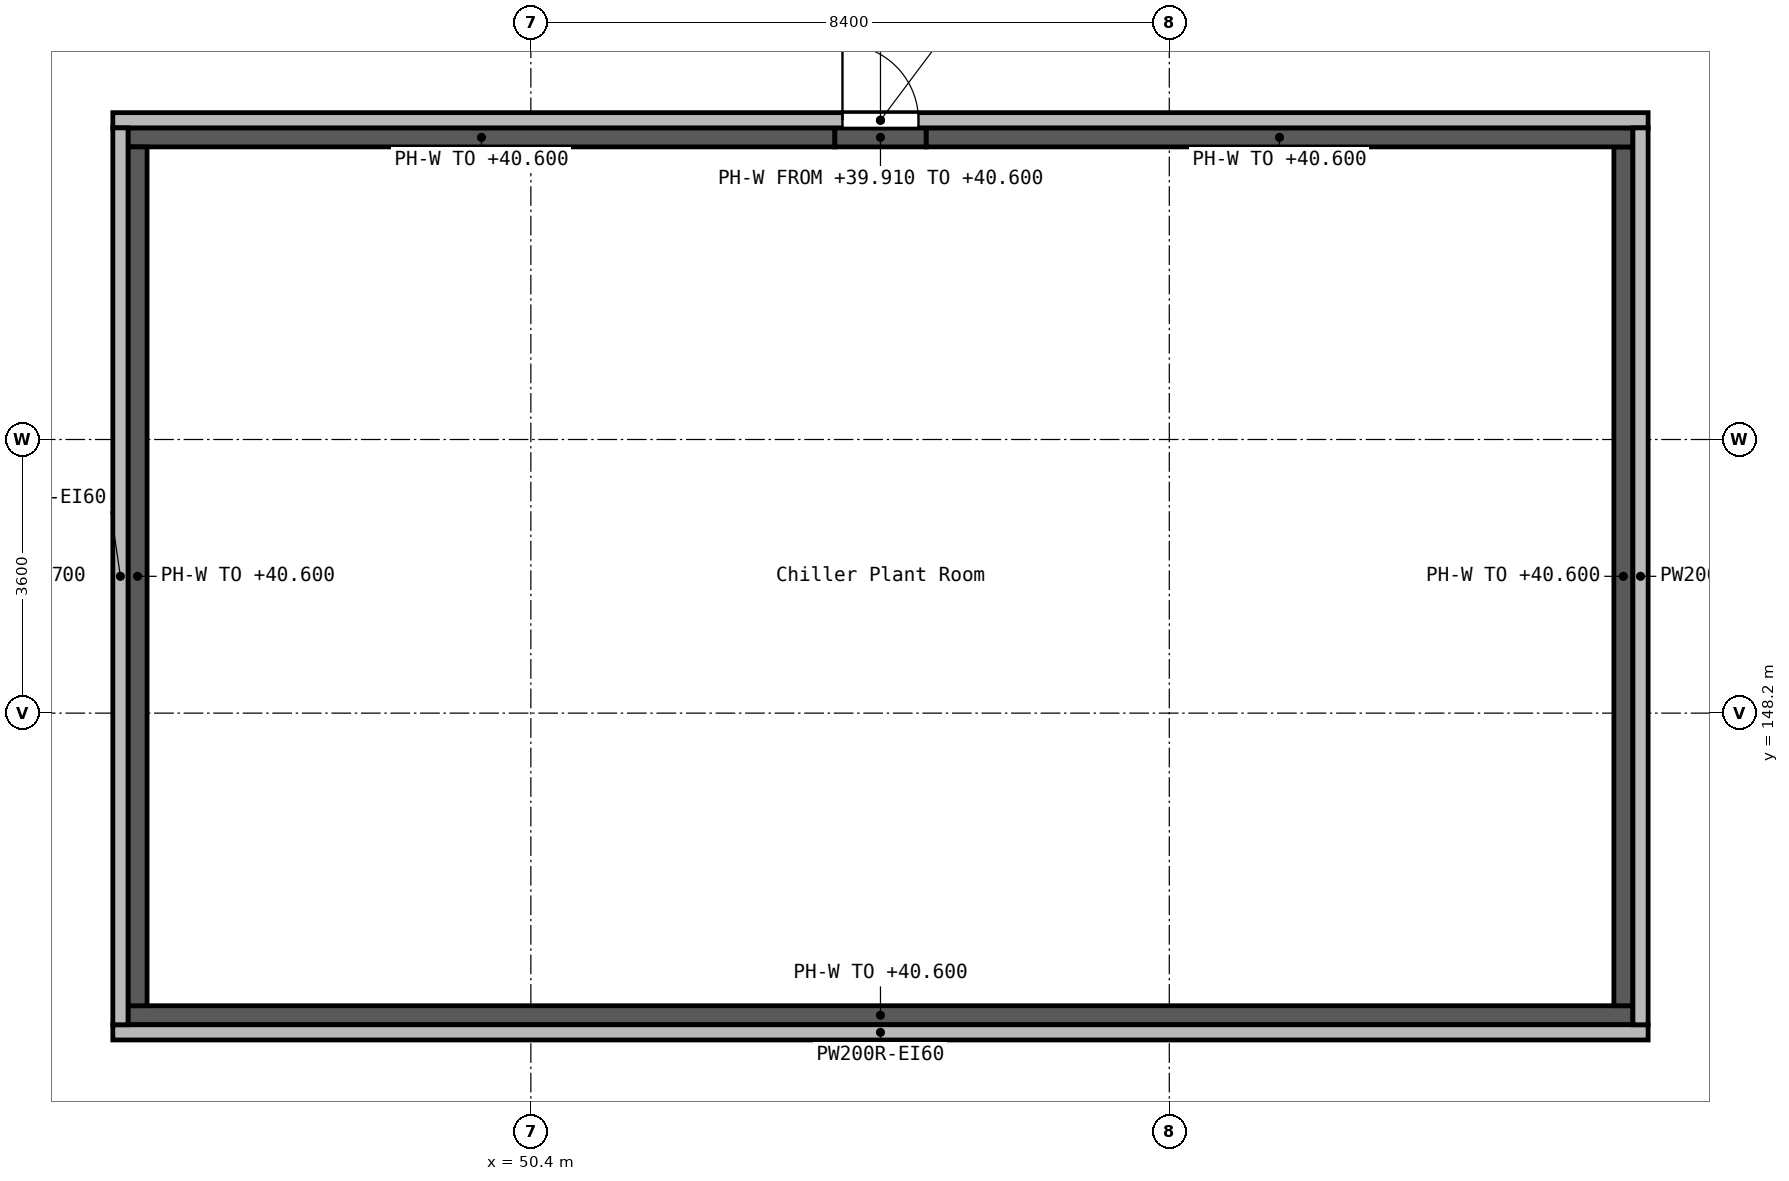
"""IFC4 building model, lengths in metres.
Left out: names, types, materials, properties, quantities, classifications, styles, units other than length and angle.
Written with IfcOpenShell. Run it as: python <this file> out.ifc"""

import sys

from ifc_helpers import new_model, si_unit, direction, frame, frame_2d, origin, place, context, subcontext, project, spatial, polyline, rectangle, outline, extrude, element, fill, save


model = new_model("IFC4")
c1 = context("Model", 3, precision=1e-05, world=origin(), true_north=direction((0.0, 1.0)))
c2 = subcontext(c1, "Body", "Model", "MODEL_VIEW")
j1 = project(units=[si_unit("LENGTHUNIT", "METRE"), si_unit("PLANEANGLEUNIT", "RADIAN")], contexts=[c1])
p1 = place(None, origin())
s1 = spatial("IfcSite", under=j1, at=p1, CompositionType="ELEMENT")
p2 = place(p1, origin())
s2 = spatial("IfcBuilding", under=s1, at=p2, CompositionType="ELEMENT")
p3 = place(p2, frame((0.0, 0.0, 36.6)))
s3 = spatial("IfcBuildingStorey", under=s2, at=p3, CompositionType="ELEMENT", Elevation=36.6)
p4 = place(p3, origin())
e1 = element("IfcWall", 1, at=p4, inside=s3, PredefinedType="SOLIDWALL", context=c2, shape_type="SweptSolid", body=[
    extrude(outline(polyline([(45.101, 144.101), (64.899, 144.101), (64.899, 144.351), (45.101, 144.351), (45.101, 144.101)])), origin(), (0.0, 0.0, 1.0), 4.0),
])
p5 = place(p3, origin())
e2 = element("IfcWall", 2, at=p5, inside=s3, PredefinedType="SOLIDWALL", context=c2, shape_type="SweptSolid", body=[
    extrude(outline(polyline([(45.101, 155.649), (45.101, 155.899), (54.4, 155.899), (54.4, 155.649), (45.101, 155.649)])), origin(), (0.0, 0.0, 1.0), 4.0),
])
p6 = place(p3, origin())
e3 = element("IfcWall", 3, at=p6, inside=s3, PredefinedType="SOLIDWALL", context=c2, shape_type="SweptSolid", body=[
    extrude(outline(polyline([(45.101, 144.351), (45.351, 144.351), (45.351, 155.649), (45.101, 155.649), (45.101, 144.351)])), origin(), (0.0, 0.0, 1.0), 4.0),
])
p7 = place(p3, origin())
e4 = element("IfcWall", 4, at=p7, inside=s3, PredefinedType="SOLIDWALL", context=c2, shape_type="SweptSolid", body=[
    extrude(outline(polyline([(64.649, 144.351), (64.899, 144.351), (64.899, 155.649), (64.649, 155.649), (64.649, 144.351)])), origin(), (0.0, 0.0, 1.0), 4.0),
])
p8 = place(p3, frame((44.9, 144.0, 0.0), z_axis=(0.0, 0.0, 1.0), x_axis=(1.0, 0.0, 0.0)))
e5 = element("IfcWall", 5, at=p8, inside=s3, PredefinedType="SOLIDWALL", context=c2, shape_type="SweptSolid", body=[
    extrude(rectangle(XDim=20.2, YDim=0.2, at=frame_2d((10.1, 0.0))), origin(), (0.0, 0.0, 1.0), 3.9),
])
p9 = place(p3, frame((44.9, 156.0, 0.0), z_axis=(0.0, 0.0, 1.0), x_axis=(1.0, 0.0, 0.0)))
e6 = element("IfcWall", 6, at=p9, inside=s3, PredefinedType="SOLIDWALL", context=c2, shape_type="SweptSolid", body=[
    extrude(rectangle(XDim=20.2, YDim=0.2, at=frame_2d((10.1, 0.0))), origin(), (0.0, 0.0, 1.0), 3.9),
])
p10 = place(p9, frame((9.6, 0.0, 0.0)))
e7 = element("IfcOpeningElement", 7, at=p10, cuts=e6, PredefinedType="OPENING", context=c2, shape_type="SweptSolid", body=[
    extrude(rectangle(XDim=1.0, YDim=2.1, at=frame_2d((0.5, 1.05))), frame((0.0, 0.11, 0.0), z_axis=(0.0, -1.0, 0.0), x_axis=(1.0, 0.0, 0.0)), (0.0, 0.0, 1.0), 0.22),
])
for number, where, z_axis, x_axis in (
    (8, (45.0, 144.1, 0.0), (0.0, 0.0, 1.0), (0.0, 1.0, 0.0)),
    (9, (65.0, 144.1, 0.0), (0.0, 0.0, 1.0), (0.0, 1.0, 0.0)),
):
    element("IfcWall", number, at=place(p3, frame(where, z_axis=z_axis, x_axis=x_axis)), inside=s3, PredefinedType="SOLIDWALL", context=c2, shape_type="SweptSolid", body=[
        extrude(rectangle(XDim=11.8, YDim=0.2, at=frame_2d((5.9, 0.0))), origin(), (0.0, 0.0, 1.0), 3.9),
    ])
p11 = place(p3, origin())
e10 = element("IfcWall", 10, at=p11, inside=s3, PredefinedType="SOLIDWALL", context=c2, shape_type="SweptSolid", body=[
    extrude(outline(polyline([(64.899, 155.899), (64.899, 155.649), (55.6, 155.649), (55.6, 155.899), (64.899, 155.899)])), origin(), (0.0, 0.0, 1.0), 4.0),
])
p12 = place(p3, frame((0.0, 0.0, 3.31)))
e11 = element("IfcWall", 11, at=p12, inside=s3, PredefinedType="SOLIDWALL", context=c2, shape_type="SweptSolid", body=[
    extrude(outline(polyline([(54.4, 155.649), (54.4, 155.899), (55.6, 155.899), (55.6, 155.649), (54.4, 155.649)])), origin(), (0.0, 0.0, 1.0), 0.69),
])
p13 = place(p10, origin())
e12 = element("IfcDoor", 12, at=p13, inside=s3, OperationType="SINGLE_SWING_RIGHT", PredefinedType="DOOR", context=c2, shape_type="SweptSolid", body=[
    extrude(rectangle(XDim=1.0, YDim=2.1, at=frame_2d((0.5, 1.05))), frame((0.0, 0.025, 0.0), z_axis=(0.0, -1.0, 0.0), x_axis=(1.0, 0.0, 0.0)), (0.0, 0.0, 1.0), 0.05),
])
fill(e7, e12)
save(model, sys.argv[1])
